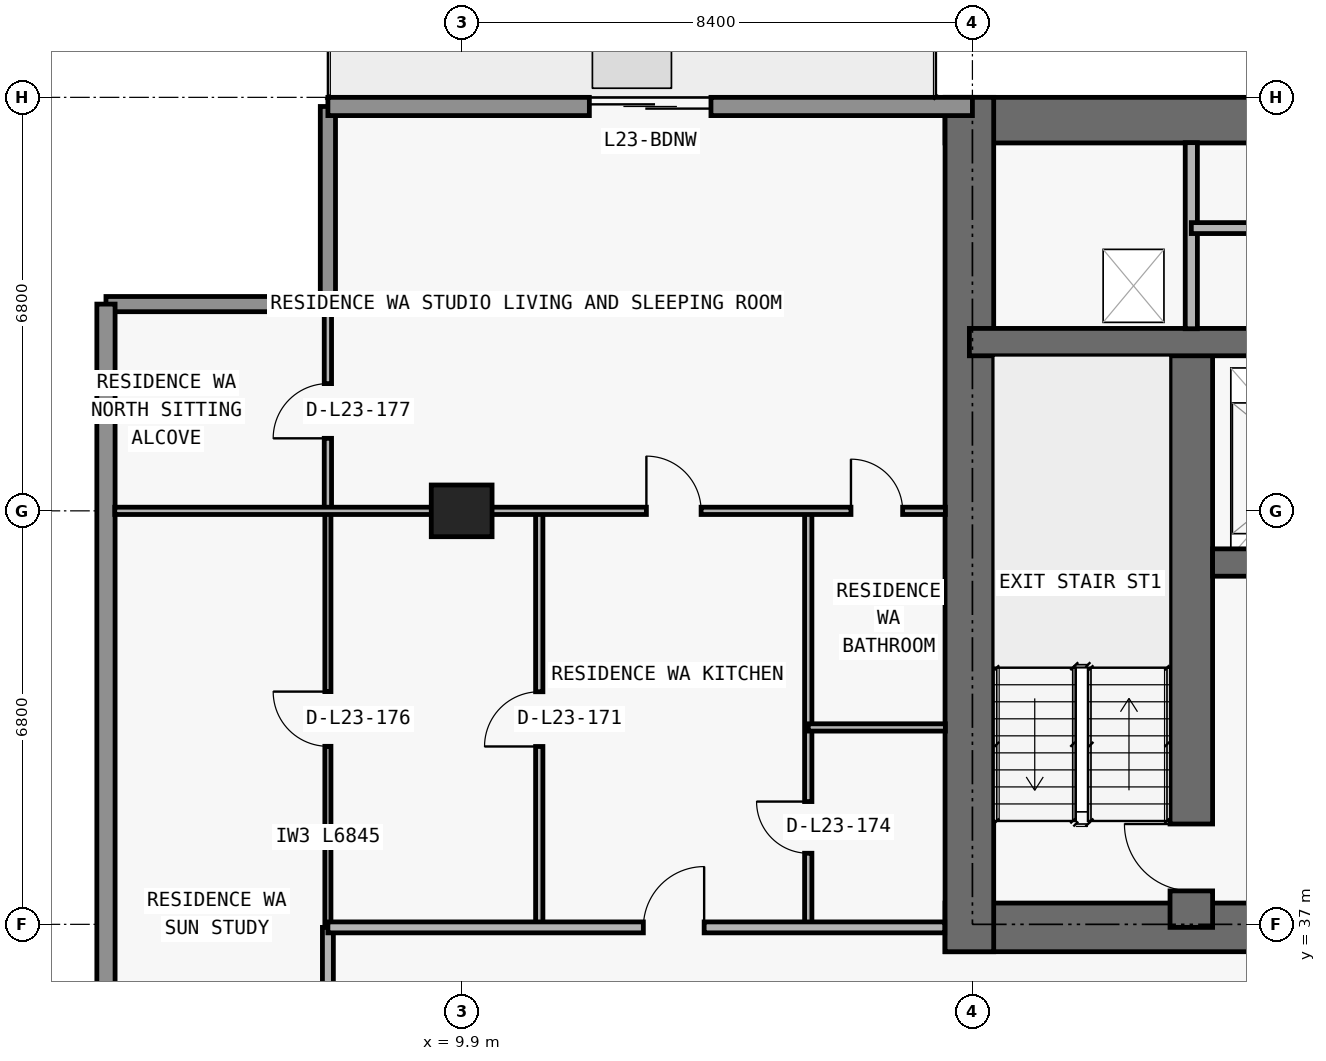
"""IFC4 building model, lengths in metres.
Left out: names, types, materials, properties, quantities, classifications, styles, units other than length and angle.
Written with IfcOpenShell. Run it as: python <this file> out.ifc"""

import sys

from ifc_helpers import new_model, si_unit, direction, frame, frame_2d, origin, origin_2d, place, context, subcontext, project, spatial, rectangle, extrude, element, fill, save


model = new_model("IFC4")
c1 = context("Model", 3, precision=1e-05, world=origin(), true_north=direction((0.0, 1.0)))
c2 = subcontext(c1, "Body", "Model", "MODEL_VIEW")
j1 = project(units=[si_unit("LENGTHUNIT", "METRE"), si_unit("PLANEANGLEUNIT", "RADIAN")], contexts=[c1])
p1 = place(None, origin())
s1 = spatial("IfcSite", under=j1, at=p1, CompositionType="ELEMENT")
p2 = place(p1, origin())
s2 = spatial("IfcBuilding", under=s1, at=p2, CompositionType="ELEMENT")
p3 = place(p2, frame((0.0, 0.0, 87.9)))
s3 = spatial("IfcBuildingStorey", under=s2, at=p3, CompositionType="ELEMENT", Elevation=87.9)
p4 = place(p3, frame((9.9, 43.8, 0.0), z_axis=(0.0, 0.0, 1.0), x_axis=(1.0, 0.0, 0.0)))
e1 = element("IfcColumn", 1, at=p4, inside=s3, PredefinedType="COLUMN", context=c2, shape_type="SweptSolid", body=[
    extrude(rectangle(XDim=1.0, YDim=0.85, at=origin_2d()), origin(), (0.0, 0.0, 1.0), 3.05),
])
p5 = place(p3, frame((17.85, 36.95, 0.0), z_axis=(0.0, 0.0, 1.0), x_axis=(1.0, 0.0, 0.0)))
e2 = element("IfcWall", 2, at=p5, inside=s3, PredefinedType="SHEAR", context=c2, shape_type="SweptSolid", body=[
    extrude(rectangle(XDim=42.1, YDim=0.8, at=frame_2d((21.05, 0.0))), origin(), (0.0, 0.0, 1.0), 3.05),
])
p6 = place(p5, frame((14.45, 0.0, 0.0)))
e3 = element("IfcOpeningElement", 3, at=p6, cuts=e2, PredefinedType="OPENING", context=c2, shape_type="SweptSolid", body=[
    extrude(rectangle(XDim=1.1, YDim=2.15, at=frame_2d((0.55, 1.075))), frame((0.0, 0.41, 0.0), z_axis=(0.0, -1.0, 0.0), x_axis=(1.0, 0.0, 0.0)), (0.0, 0.0, 1.0), 0.82),
])
p7 = place(p5, frame((6.3, 0.0, 0.0)))
e4 = element("IfcOpeningElement", 4, at=p7, cuts=e2, PredefinedType="OPENING", context=c2, shape_type="SweptSolid", body=[
    extrude(rectangle(XDim=1.05, YDim=2.15, at=frame_2d((0.525, 1.075))), frame((0.0, 0.41, 0.0), z_axis=(0.0, -1.0, 0.0), x_axis=(1.0, 0.0, 0.0)), (0.0, 0.0, 1.0), 0.82),
])
p8 = place(p5, frame((34.8, 0.0, 0.0)))
e5 = element("IfcOpeningElement", 5, at=p8, cuts=e2, PredefinedType="OPENING", context=c2, shape_type="SweptSolid", body=[
    extrude(rectangle(XDim=1.05, YDim=2.15, at=frame_2d((0.525, 1.075))), frame((0.0, 0.41, 0.0), z_axis=(0.0, -1.0, 0.0), x_axis=(1.0, 0.0, 0.0)), (0.0, 0.0, 1.0), 0.82),
])
p9 = place(p5, frame((10.913, 0.0, 0.0)))
e6 = element("IfcOpeningElement", 6, at=p9, cuts=e2, PredefinedType="OPENING", context=c2, shape_type="SweptSolid", body=[
    extrude(rectangle(XDim=1.05, YDim=2.15, at=frame_2d((0.525, 1.075))), frame((0.0, 0.41, 0.0), z_axis=(0.0, -1.0, 0.0), x_axis=(1.0, 0.0, 0.0)), (0.0, 0.0, 1.0), 0.82),
])
p10 = place(p5, frame((24.15, 0.0, 0.0)))
e7 = element("IfcOpeningElement", 7, at=p10, cuts=e2, PredefinedType="OPENING", context=c2, shape_type="SweptSolid", body=[
    extrude(rectangle(XDim=1.05, YDim=2.15, at=frame_2d((0.525, 1.075))), frame((0.0, 0.41, 0.0), z_axis=(0.0, -1.0, 0.0), x_axis=(1.0, 0.0, 0.0)), (0.0, 0.0, 1.0), 0.82),
])
p11 = place(p3, frame((17.85, 50.225, 0.0), z_axis=(0.0, 0.0, 1.0), x_axis=(1.0, 0.0, 0.0)))
e8 = element("IfcWall", 8, at=p11, inside=s3, PredefinedType="SHEAR", context=c2, shape_type="SweptSolid", body=[
    extrude(rectangle(XDim=42.1, YDim=0.75, at=frame_2d((21.05, 0.0))), origin(), (0.0, 0.0, 1.0), 3.05),
])
p12 = place(p3, frame((18.25, 36.55, 0.0), z_axis=(0.0, 0.0, 1.0), x_axis=(0.0, 1.0, 0.0)))
e9 = element("IfcWall", 9, at=p12, inside=s3, PredefinedType="SHEAR", context=c2, shape_type="SweptSolid", body=[
    extrude(rectangle(XDim=14.05, YDim=0.8, at=frame_2d((7.025, 0.0))), origin(), (0.0, 0.0, 1.0), 3.05),
])
p13 = place(p3, frame((21.9, 36.95, 0.0), z_axis=(0.0, 0.0, 1.0), x_axis=(0.0, 1.0, 0.0)))
e10 = element("IfcWall", 10, at=p13, inside=s3, PredefinedType="SHEAR", context=c2, shape_type="SweptSolid", body=[
    extrude(rectangle(XDim=9.625, YDim=0.7, at=frame_2d((4.812, 0.0))), origin(), (0.0, 0.0, 1.0), 3.05),
])
p14 = place(p13, frame((0.6, 0.0, 0.0)))
e11 = element("IfcOpeningElement", 11, at=p14, cuts=e10, PredefinedType="OPENING", context=c2, shape_type="SweptSolid", body=[
    extrude(rectangle(XDim=1.1, YDim=2.15, at=frame_2d((0.55, 1.075))), frame((0.0, 0.36, 0.0), z_axis=(0.0, -1.0, 0.0), x_axis=(1.0, 0.0, 0.0)), (0.0, 0.0, 1.0), 0.72),
])
p15 = place(p3, frame((22.25, 42.95, 0.0), z_axis=(0.0, 0.0, 1.0), x_axis=(1.0, 0.0, 0.0)))
e12 = element("IfcWall", 12, at=p15, inside=s3, PredefinedType="SHEAR", context=c2, shape_type="SweptSolid", body=[
    extrude(rectangle(XDim=33.3, YDim=0.45, at=frame_2d((16.65, 0.0))), origin(), (0.0, 0.0, 1.0), 3.05),
])
p16 = place(p15, frame((1.05, 0.0, 0.0)))
e13 = element("IfcOpeningElement", 13, at=p16, cuts=e12, PredefinedType="OPENING", context=c2, shape_type="SweptSolid", body=[
    extrude(rectangle(XDim=1.2, YDim=2.2, at=frame_2d((0.6, 1.1))), frame((0.0, 0.235, 0.0), z_axis=(0.0, -1.0, 0.0), x_axis=(1.0, 0.0, 0.0)), (0.0, 0.0, 1.0), 0.47),
])
p17 = place(p15, frame((31.05, 0.0, 0.0)))
e14 = element("IfcOpeningElement", 14, at=p17, cuts=e12, PredefinedType="OPENING", context=c2, shape_type="SweptSolid", body=[
    extrude(rectangle(XDim=1.2, YDim=2.2, at=frame_2d((0.6, 1.1))), frame((0.0, 0.235, 0.0), z_axis=(0.0, -1.0, 0.0), x_axis=(1.0, 0.0, 0.0)), (0.0, 0.0, 1.0), 0.47),
])
p18 = place(p15, frame((13.5, 0.0, 0.0)))
e15 = element("IfcOpeningElement", 15, at=p18, cuts=e12, PredefinedType="OPENING", context=c2, shape_type="SweptSolid", body=[
    extrude(rectangle(XDim=1.1, YDim=2.2, at=frame_2d((0.55, 1.1))), frame((0.0, 0.235, 0.0), z_axis=(0.0, -1.0, 0.0), x_axis=(1.0, 0.0, 0.0)), (0.0, 0.0, 1.0), 0.47),
])
p19 = place(p15, frame((16.1, 0.0, 0.0)))
e16 = element("IfcOpeningElement", 16, at=p19, cuts=e12, PredefinedType="OPENING", context=c2, shape_type="SweptSolid", body=[
    extrude(rectangle(XDim=1.1, YDim=2.2, at=frame_2d((0.55, 1.1))), frame((0.0, 0.235, 0.0), z_axis=(0.0, -1.0, 0.0), x_axis=(1.0, 0.0, 0.0)), (0.0, 0.0, 1.0), 0.47),
])
p20 = place(p15, frame((18.7, 0.0, 0.0)))
e17 = element("IfcOpeningElement", 17, at=p20, cuts=e12, PredefinedType="OPENING", context=c2, shape_type="SweptSolid", body=[
    extrude(rectangle(XDim=1.1, YDim=2.2, at=frame_2d((0.55, 1.1))), frame((0.0, 0.235, 0.0), z_axis=(0.0, -1.0, 0.0), x_axis=(1.0, 0.0, 0.0)), (0.0, 0.0, 1.0), 0.47),
])
p21 = place(p15, frame((3.625, 0.0, 0.0)))
e18 = element("IfcOpeningElement", 18, at=p21, cuts=e12, PredefinedType="OPENING", context=c2, shape_type="SweptSolid", body=[
    extrude(rectangle(XDim=1.05, YDim=2.15, at=frame_2d((0.525, 1.075))), frame((0.0, 0.235, 0.0), z_axis=(0.0, -1.0, 0.0), x_axis=(1.0, 0.0, 0.0)), (0.0, 0.0, 1.0), 0.47),
])
p22 = place(p15, frame((28.675, 0.0, 0.0)))
e19 = element("IfcOpeningElement", 19, at=p22, cuts=e12, PredefinedType="OPENING", context=c2, shape_type="SweptSolid", body=[
    extrude(rectangle(XDim=1.05, YDim=2.15, at=frame_2d((0.525, 1.075))), frame((0.0, 0.235, 0.0), z_axis=(0.0, -1.0, 0.0), x_axis=(1.0, 0.0, 0.0)), (0.0, 0.0, 1.0), 0.47),
])
p23 = place(p3, frame((18.25, 46.575, 0.0), z_axis=(0.0, 0.0, 1.0), x_axis=(1.0, 0.0, 0.0)))
e20 = element("IfcWall", 20, at=p23, inside=s3, PredefinedType="SHEAR", context=c2, shape_type="SweptSolid", body=[
    extrude(rectangle(XDim=41.3, YDim=0.45, at=frame_2d((20.65, 0.0))), origin(), (0.0, 0.0, 1.0), 3.05),
])
p24 = place(p23, frame((7.625, 0.0, 0.0)))
e21 = element("IfcOpeningElement", 21, at=p24, cuts=e20, PredefinedType="OPENING", context=c2, shape_type="SweptSolid", body=[
    extrude(rectangle(XDim=1.05, YDim=2.15, at=frame_2d((0.525, 1.075))), frame((0.0, 0.235, 0.0), z_axis=(0.0, -1.0, 0.0), x_axis=(1.0, 0.0, 0.0)), (0.0, 0.0, 1.0), 0.47),
])
p25 = place(p23, frame((32.675, 0.0, 0.0)))
e22 = element("IfcOpeningElement", 22, at=p25, cuts=e20, PredefinedType="OPENING", context=c2, shape_type="SweptSolid", body=[
    extrude(rectangle(XDim=1.05, YDim=2.15, at=frame_2d((0.525, 1.075))), frame((0.0, 0.235, 0.0), z_axis=(0.0, -1.0, 0.0), x_axis=(1.0, 0.0, 0.0)), (0.0, 0.0, 1.0), 0.47),
])
p26 = place(p3, frame((4.05, 47.2, 0.0), z_axis=(0.0, 0.0, 1.0), x_axis=(1.0, 0.0, 0.0)))
e23 = element("IfcWall", 23, at=p26, inside=s3, PredefinedType="ELEMENTEDWALL", context=c2, shape_type="SweptSolid", body=[
    extrude(rectangle(XDim=3.65, YDim=0.25, at=frame_2d((1.825, 0.0))), origin(), (0.0, 0.0, 1.0), 3.05),
])
p27 = place(p3, frame((7.7, 47.2, 0.0), z_axis=(0.0, 0.0, 1.0), x_axis=(0.0, 1.0, 0.0)))
e24 = element("IfcWall", 24, at=p27, inside=s3, PredefinedType="ELEMENTEDWALL", context=c2, shape_type="SweptSolid", body=[
    extrude(rectangle(XDim=3.25, YDim=0.25, at=frame_2d((1.625, 0.0))), origin(), (0.0, 0.0, 1.0), 3.05),
])
p28 = place(p3, frame((4.05, 28.0, 0.0), z_axis=(0.0, 0.0, 1.0), x_axis=(0.0, 1.0, 0.0)))
e25 = element("IfcWall", 25, at=p28, inside=s3, PredefinedType="STANDARD", context=c2, shape_type="SweptSolid", body=[
    extrude(rectangle(XDim=19.2, YDim=0.3, at=frame_2d((9.6, 0.0))), origin(), (0.0, 0.0, 1.0), 3.05),
])
p29 = place(p3, frame((7.7, 50.45, 0.0), z_axis=(0.0, 0.0, 1.0), x_axis=(1.0, 0.0, 0.0)))
e26 = element("IfcWall", 26, at=p29, inside=s3, PredefinedType="STANDARD", context=c2, shape_type="SweptSolid", body=[
    extrude(rectangle(XDim=10.6, YDim=0.3, at=frame_2d((5.3, 0.0))), origin(), (0.0, 0.0, 1.0), 3.05),
])
p30 = place(p29, frame((4.3, 0.0, 0.0)))
e27 = element("IfcOpeningElement", 27, at=p30, cuts=e26, PredefinedType="OPENING", context=c2, shape_type="SweptSolid", body=[
    extrude(rectangle(XDim=2.0, YDim=2.3, at=frame_2d((1.0, 1.15))), frame((0.0, 0.16, 0.0), z_axis=(0.0, -1.0, 0.0), x_axis=(1.0, 0.0, 0.0)), (0.0, 0.0, 1.0), 0.32),
])
p31 = place(p3, frame((7.7, 34.405, 0.0), z_axis=(0.0, 0.0, 1.0), x_axis=(0.0, 1.0, 0.0)))
e28 = element("IfcWall", 28, at=p31, inside=s3, PredefinedType="PARTITIONING", context=c2, shape_type="SweptSolid", body=[
    extrude(rectangle(XDim=2.545, YDim=0.18, at=frame_2d((1.272, 0.0))), origin(), (0.0, 0.0, 1.0), 3.05),
])
p32 = place(p3, frame((7.7, 36.955, 0.0), z_axis=(0.0, 0.0, 1.0), x_axis=(0.0, 1.0, 0.0)))
e29 = element("IfcWall", 29, at=p32, inside=s3, PredefinedType="MOVABLE", context=c2, shape_type="SweptSolid", body=[
    extrude(rectangle(XDim=6.845, YDim=0.1, at=frame_2d((3.422, 0.0))), origin(), (0.0, 0.0, 1.0), 3.05),
])
p33 = place(p32, frame((2.972, 0.0, 0.0)))
e30 = element("IfcOpeningElement", 30, at=p33, cuts=e29, PredefinedType="OPENING", context=c2, shape_type="SweptSolid", body=[
    extrude(rectangle(XDim=0.9, YDim=2.15, at=frame_2d((0.45, 1.075))), frame((0.0, 0.06, 0.0), z_axis=(0.0, -1.0, 0.0), x_axis=(1.0, 0.0, 0.0)), (0.0, 0.0, 1.0), 0.12),
])
p34 = place(p3, frame((7.7, 43.805, 0.0), z_axis=(0.0, 0.0, 1.0), x_axis=(0.0, 1.0, 0.0)))
e31 = element("IfcWall", 31, at=p34, inside=s3, PredefinedType="PARTITIONING", context=c2, shape_type="SweptSolid", body=[
    extrude(rectangle(XDim=3.275, YDim=0.12, at=frame_2d((1.638, 0.0))), origin(), (0.0, 0.0, 1.0), 3.05),
])
p35 = place(p34, frame((1.188, 0.0, 0.0)))
e32 = element("IfcOpeningElement", 32, at=p35, cuts=e31, PredefinedType="OPENING", context=c2, shape_type="SweptSolid", body=[
    extrude(rectangle(XDim=0.9, YDim=2.15, at=frame_2d((0.45, 1.075))), frame((0.0, 0.07, 0.0), z_axis=(0.0, -1.0, 0.0), x_axis=(1.0, 0.0, 0.0)), (0.0, 0.0, 1.0), 0.14),
])
p36 = place(p3, frame((11.176, 36.95, 0.0), z_axis=(0.0, 0.0, 1.0), x_axis=(0.0, 1.0, 0.0)))
e33 = element("IfcWall", 33, at=p36, inside=s3, PredefinedType="PARTITIONING", context=c2, shape_type="SweptSolid", body=[
    extrude(rectangle(XDim=6.85, YDim=0.12, at=frame_2d((3.425, 0.0))), origin(), (0.0, 0.0, 1.0), 3.05),
])
p37 = place(p36, frame((2.975, 0.0, 0.0)))
e34 = element("IfcOpeningElement", 34, at=p37, cuts=e33, PredefinedType="OPENING", context=c2, shape_type="SweptSolid", body=[
    extrude(rectangle(XDim=0.9, YDim=2.15, at=frame_2d((0.45, 1.075))), frame((0.0, 0.07, 0.0), z_axis=(0.0, -1.0, 0.0), x_axis=(1.0, 0.0, 0.0)), (0.0, 0.0, 1.0), 0.14),
])
p38 = place(p3, frame((15.6, 36.95, 0.0), z_axis=(0.0, 0.0, 1.0), x_axis=(0.0, 1.0, 0.0)))
e35 = element("IfcWall", 35, at=p38, inside=s3, PredefinedType="PARTITIONING", context=c2, shape_type="SweptSolid", body=[
    extrude(rectangle(XDim=6.85, YDim=0.12, at=frame_2d((3.425, 0.0))), origin(), (0.0, 0.0, 1.0), 3.05),
])
p39 = place(p38, frame((1.219, 0.0, 0.0)))
e36 = element("IfcOpeningElement", 36, at=p39, cuts=e35, PredefinedType="OPENING", context=c2, shape_type="SweptSolid", body=[
    extrude(rectangle(XDim=0.85, YDim=2.1, at=frame_2d((0.425, 1.05))), frame((0.0, 0.07, 0.0), z_axis=(0.0, -1.0, 0.0), x_axis=(1.0, 0.0, 0.0)), (0.0, 0.0, 1.0), 0.14),
])
p40 = place(p3, frame((21.9, 46.795, 0.0), z_axis=(0.0, 0.0, 1.0), x_axis=(0.0, 1.0, 0.0)))
e37 = element("IfcWall", 37, at=p40, inside=s3, PredefinedType="PARTITIONING", context=c2, shape_type="SweptSolid", body=[
    extrude(rectangle(XDim=3.06, YDim=0.2, at=frame_2d((1.53, 0.0))), origin(), (0.0, 0.0, 1.0), 3.05),
])
p41 = place(p3, frame((7.7, 36.95, 0.0), z_axis=(0.0, 0.0, 1.0), x_axis=(1.0, 0.0, 0.0)))
e38 = element("IfcWall", 38, at=p41, inside=s3, PredefinedType="PARTITIONING", context=c2, shape_type="SweptSolid", body=[
    extrude(rectangle(XDim=10.145, YDim=0.18, at=frame_2d((5.073, 0.0))), origin(), (0.0, 0.0, 1.0), 3.05),
])
p42 = place(p41, frame((5.188, 0.0, 0.0)))
e39 = element("IfcOpeningElement", 39, at=p42, cuts=e38, PredefinedType="OPENING", context=c2, shape_type="SweptSolid", body=[
    extrude(rectangle(XDim=1.0, YDim=2.2, at=frame_2d((0.5, 1.1))), frame((0.0, 0.1, 0.0), z_axis=(0.0, -1.0, 0.0), x_axis=(1.0, 0.0, 0.0)), (0.0, 0.0, 1.0), 0.2),
])
p43 = place(p3, frame((15.6, 40.238, 0.0), z_axis=(0.0, 0.0, 1.0), x_axis=(1.0, 0.0, 0.0)))
e40 = element("IfcWall", 40, at=p43, inside=s3, PredefinedType="PARTITIONING", context=c2, shape_type="SweptSolid", body=[
    extrude(rectangle(XDim=2.255, YDim=0.12, at=frame_2d((1.127, 0.0))), origin(), (0.0, 0.0, 1.0), 3.05),
])
p44 = place(p3, frame((4.195, 43.8, 0.0), z_axis=(0.0, 0.0, 1.0), x_axis=(1.0, 0.0, 0.0)))
e41 = element("IfcWall", 41, at=p44, inside=s3, PredefinedType="PARTITIONING", context=c2, shape_type="SweptSolid", body=[
    extrude(rectangle(XDim=13.66, YDim=0.12, at=frame_2d((6.83, 0.0))), origin(), (0.0, 0.0, 1.0), 2.339),
])
p45 = place(p44, frame((8.743, 0.0, 0.0)))
e42 = element("IfcOpeningElement", 42, at=p45, cuts=e41, PredefinedType="OPENING", context=c2, shape_type="SweptSolid", body=[
    extrude(rectangle(XDim=0.9, YDim=2.15, at=frame_2d((0.45, 1.075))), frame((0.0, 0.07, 0.0), z_axis=(0.0, -1.0, 0.0), x_axis=(1.0, 0.0, 0.0)), (0.0, 0.0, 1.0), 0.14),
])
p46 = place(p44, frame((12.107, 0.0, 0.0)))
e43 = element("IfcOpeningElement", 43, at=p46, cuts=e41, PredefinedType="OPENING", context=c2, shape_type="SweptSolid", body=[
    extrude(rectangle(XDim=0.85, YDim=2.1, at=frame_2d((0.425, 1.05))), frame((0.0, 0.07, 0.0), z_axis=(0.0, -1.0, 0.0), x_axis=(1.0, 0.0, 0.0)), (0.0, 0.0, 1.0), 0.14),
])
p47 = place(p3, frame((21.9, 48.45, 0.0), z_axis=(0.0, 0.0, 1.0), x_axis=(1.0, 0.0, 0.0)))
e44 = element("IfcWall", 44, at=p47, inside=s3, PredefinedType="PARTITIONING", context=c2, shape_type="SweptSolid", body=[
    extrude(rectangle(XDim=4.75, YDim=0.18, at=frame_2d((2.375, 0.0))), origin(), (0.0, 0.0, 1.0), 3.05),
])
p48 = place(p47, frame((1.775, 0.0, 0.0)))
e45 = element("IfcOpeningElement", 45, at=p48, cuts=e44, PredefinedType="OPENING", context=c2, shape_type="SweptSolid", body=[
    extrude(rectangle(XDim=1.2, YDim=2.2, at=frame_2d((0.6, 1.1))), frame((0.0, 0.1, 0.0), z_axis=(0.0, -1.0, 0.0), x_axis=(1.0, 0.0, 0.0)), (0.0, 0.0, 1.0), 0.2),
])
p49 = place(p30, origin())
e46 = element("IfcDoor", 46, at=p49, inside=s3, OperationType="DOUBLE_DOOR_SLIDING", PredefinedType="DOOR", context=c2, shape_type="SweptSolid", body=[
    extrude(rectangle(XDim=2.0, YDim=2.3, at=frame_2d((1.0, 1.15))), frame((0.0, 0.025, 0.0), z_axis=(0.0, -1.0, 0.0), x_axis=(1.0, 0.0, 0.0)), (0.0, 0.0, 1.0), 0.05),
])
fill(e27, e46)
p50 = place(p14, origin())
e47 = element("IfcDoor", 47, at=p50, inside=s3, OperationType="SINGLE_SWING_RIGHT", PredefinedType="DOOR", context=c2, shape_type="SweptSolid", body=[
    extrude(rectangle(XDim=1.1, YDim=2.15, at=frame_2d((0.55, 1.075))), frame((0.0, 0.025, 0.0), z_axis=(0.0, -1.0, 0.0), x_axis=(1.0, 0.0, 0.0)), (0.0, 0.0, 1.0), 0.05),
])
fill(e11, e47)
p51 = place(p37, origin())
e48 = element("IfcDoor", 48, at=p51, inside=s3, OperationType="SINGLE_SWING_LEFT", PredefinedType="DOOR", context=c2, shape_type="SweptSolid", body=[
    extrude(rectangle(XDim=0.9, YDim=2.15, at=frame_2d((0.45, 1.075))), frame((0.0, 0.025, 0.0), z_axis=(0.0, -1.0, 0.0), x_axis=(1.0, 0.0, 0.0)), (0.0, 0.0, 1.0), 0.05),
])
fill(e34, e48)
p52 = place(p42, origin())
e49 = element("IfcDoor", 49, at=p52, inside=s3, OperationType="SINGLE_SWING_RIGHT", PredefinedType="DOOR", context=c2, shape_type="SweptSolid", body=[
    extrude(rectangle(XDim=1.0, YDim=2.2, at=frame_2d((0.5, 1.1))), frame((0.0, 0.025, 0.0), z_axis=(0.0, -1.0, 0.0), x_axis=(1.0, 0.0, 0.0)), (0.0, 0.0, 1.0), 0.05),
])
fill(e39, e49)
p53 = place(p45, origin())
e50 = element("IfcDoor", 50, at=p53, inside=s3, OperationType="SINGLE_SWING_LEFT", PredefinedType="DOOR", context=c2, shape_type="SweptSolid", body=[
    extrude(rectangle(XDim=0.9, YDim=2.15, at=frame_2d((0.45, 1.075))), frame((0.0, 0.025, 0.0), z_axis=(0.0, -1.0, 0.0), x_axis=(1.0, 0.0, 0.0)), (0.0, 0.0, 1.0), 0.05),
])
fill(e42, e50)
p54 = place(p39, origin())
e51 = element("IfcDoor", 51, at=p54, inside=s3, OperationType="SINGLE_SWING_RIGHT", PredefinedType="DOOR", context=c2, shape_type="SweptSolid", body=[
    extrude(rectangle(XDim=0.85, YDim=2.1, at=frame_2d((0.425, 1.05))), frame((0.0, 0.025, 0.0), z_axis=(0.0, -1.0, 0.0), x_axis=(1.0, 0.0, 0.0)), (0.0, 0.0, 1.0), 0.05),
])
fill(e36, e51)
p55 = place(p46, origin())
e52 = element("IfcDoor", 52, at=p55, inside=s3, OperationType="SINGLE_SWING_LEFT", PredefinedType="DOOR", context=c2, shape_type="SweptSolid", body=[
    extrude(rectangle(XDim=0.85, YDim=2.1, at=frame_2d((0.425, 1.05))), frame((0.0, 0.025, 0.0), z_axis=(0.0, -1.0, 0.0), x_axis=(1.0, 0.0, 0.0)), (0.0, 0.0, 1.0), 0.05),
])
fill(e43, e52)
p56 = place(p33, origin())
e53 = element("IfcDoor", 53, at=p56, inside=s3, OperationType="SINGLE_SWING_RIGHT", PredefinedType="DOOR", context=c2, shape_type="SweptSolid", body=[
    extrude(rectangle(XDim=0.9, YDim=2.15, at=frame_2d((0.45, 1.075))), frame((0.0, 0.025, 0.0), z_axis=(0.0, -1.0, 0.0), x_axis=(1.0, 0.0, 0.0)), (0.0, 0.0, 1.0), 0.05),
])
fill(e30, e53)
p57 = place(p35, origin())
e54 = element("IfcDoor", 54, at=p57, inside=s3, OperationType="SINGLE_SWING_LEFT", PredefinedType="DOOR", context=c2, shape_type="SweptSolid", body=[
    extrude(rectangle(XDim=0.9, YDim=2.15, at=frame_2d((0.45, 1.075))), frame((0.0, 0.025, 0.0), z_axis=(0.0, -1.0, 0.0), x_axis=(1.0, 0.0, 0.0)), (0.0, 0.0, 1.0), 0.05),
])
fill(e32, e54)
save(model, sys.argv[1])
